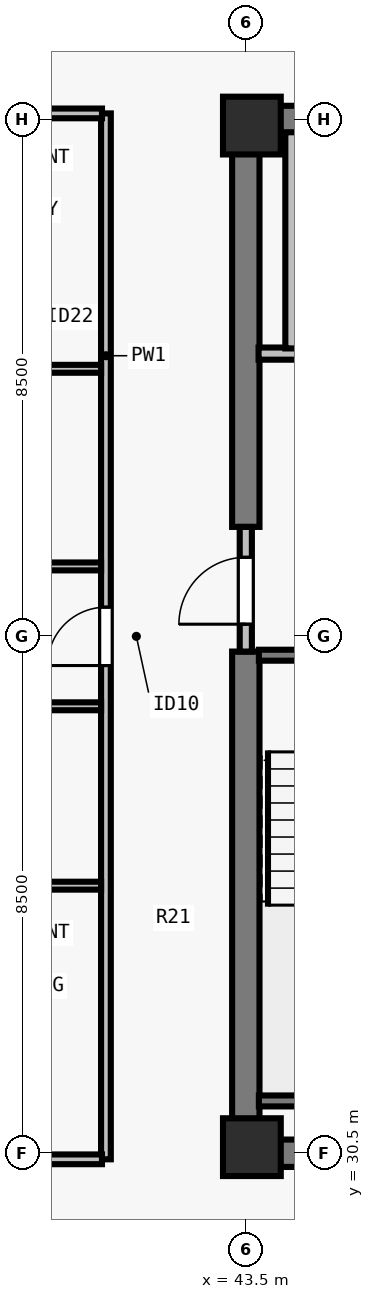
"""IFC4 building model, lengths in metres.
Left out: names, types, materials, properties, quantities, classifications, styles, units other than length and angle.
Written with IfcOpenShell. Run it as: python <this file> out.ifc"""

import sys

from ifc_helpers import new_model, si_unit, direction, frame, frame_2d, origin, origin_2d, place, context, subcontext, project, spatial, rectangle, extrude, element, fill, save


model = new_model("IFC4")
c1 = context("Model", 3, precision=1e-05, world=origin(), true_north=direction((0.0, 1.0)))
c2 = subcontext(c1, "Body", "Model", "MODEL_VIEW")
j1 = project(units=[si_unit("LENGTHUNIT", "METRE"), si_unit("PLANEANGLEUNIT", "RADIAN")], contexts=[c1])
p1 = place(None, origin())
s1 = spatial("IfcSite", under=j1, at=p1, CompositionType="ELEMENT")
p2 = place(p1, origin())
s2 = spatial("IfcBuilding", under=s1, at=p2, CompositionType="ELEMENT")
p3 = place(p2, frame((0.0, 0.0, 262.0)))
s3 = spatial("IfcBuildingStorey", under=s2, at=p3, CompositionType="ELEMENT", Elevation=262.0)
for number, where, z_axis, x_axis in (
    (1, (43.6, 30.6, 0.0), (0.0, 0.0, 1.0), (1.0, 0.0, 0.0)),
    (2, (43.6, 47.4, 0.0), (0.0, 0.0, 1.0), (1.0, 0.0, 0.0)),
):
    element("IfcColumn", number, at=place(p3, frame(where, z_axis=z_axis, x_axis=x_axis)), inside=s3, PredefinedType="COLUMN", context=c2, shape_type="SweptSolid", body=[
        extrude(rectangle(XDim=0.95, YDim=0.95, at=origin_2d()), origin(), (0.0, 0.0, 1.0), 3.5),
    ])
for number, where, z_axis, x_axis in (
    (3, (43.275, 30.5, 0.0), (0.0, 0.0, 1.0), (1.0, 0.0, 0.0)),
    (4, (43.275, 47.5, 0.0), (0.0, 0.0, 1.0), (1.0, 0.0, 0.0)),
):
    element("IfcWall", number, at=place(p3, frame(where, z_axis=z_axis, x_axis=x_axis)), inside=s3, PredefinedType="SHEAR", context=c2, shape_type="SweptSolid", body=[
        extrude(rectangle(XDim=17.45, YDim=0.45, at=frame_2d((8.725, 0.0))), origin(), (0.0, 0.0, 1.0), 3.29),
    ])
p4 = place(p3, frame((43.5, 30.715, 0.0), z_axis=(0.0, 0.0, 1.0), x_axis=(0.0, 1.0, 0.0)))
e5 = element("IfcWall", 5, at=p4, inside=s3, PredefinedType="SHEAR", context=c2, shape_type="SweptSolid", body=[
    extrude(rectangle(XDim=8.035, YDim=0.45, at=frame_2d((4.018, 0.0))), origin(), (0.0, 0.0, 1.0), 3.29),
])
p5 = place(p3, frame((43.5, 40.8, 0.0), z_axis=(0.0, 0.0, 1.0), x_axis=(0.0, 1.0, 0.0)))
e6 = element("IfcWall", 6, at=p5, inside=s3, PredefinedType="SHEAR", context=c2, shape_type="SweptSolid", body=[
    extrude(rectangle(XDim=6.485, YDim=0.45, at=frame_2d((3.242, 0.0))), origin(), (0.0, 0.0, 1.0), 3.29),
])
p6 = place(p3, frame((43.5, 38.75, 0.0), z_axis=(0.0, 0.0, 1.0), x_axis=(0.0, 1.0, 0.0)))
e7 = element("IfcWall", 7, at=p6, inside=s3, PredefinedType="SOLIDWALL", context=c2, shape_type="SweptSolid", body=[
    extrude(rectangle(XDim=2.05, YDim=0.2, at=frame_2d((1.025, 0.0))), origin(), (0.0, 0.0, 1.0), 3.29),
])
p7 = place(p6, frame((0.45, 0.0, 0.0)))
e8 = element("IfcOpeningElement", 8, at=p7, cuts=e7, PredefinedType="OPENING", context=c2, shape_type="SweptSolid", body=[
    extrude(rectangle(XDim=1.1, YDim=2.15, at=frame_2d((0.55, 1.075))), frame((0.0, 0.11, 0.0), z_axis=(0.0, -1.0, 0.0), x_axis=(1.0, 0.0, 0.0)), (0.0, 0.0, 1.0), 0.22),
])
p8 = place(p3, frame((43.71, 43.65, 0.0), z_axis=(0.0, 0.0, 1.0), x_axis=(1.0, 0.0, 0.0)))
e9 = element("IfcWall", 9, at=p8, inside=s3, PredefinedType="SOLIDWALL", context=c2, shape_type="SweptSolid", body=[
    extrude(rectangle(XDim=3.555, YDim=0.2, at=frame_2d((1.777, 0.0))), origin(), (0.0, 0.0, 1.0), 3.29),
])
p9 = place(p8, frame((1.16, 0.0, 0.0)))
e10 = element("IfcOpeningElement", 10, at=p9, cuts=e9, PredefinedType="OPENING", context=c2, shape_type="SweptSolid", body=[
    extrude(rectangle(XDim=1.1, YDim=2.2, at=frame_2d((0.55, 1.1))), frame((0.0, 0.11, 0.0), z_axis=(0.0, -1.0, 0.0), x_axis=(1.0, 0.0, 0.0)), (0.0, 0.0, 1.0), 0.22),
])
p10 = place(p3, frame((44.25, 43.735, 0.0), z_axis=(0.0, 0.0, 1.0), x_axis=(0.0, 1.0, 0.0)))
e11 = element("IfcWall", 11, at=p10, inside=s3, PredefinedType="SOLIDWALL", context=c2, shape_type="SweptSolid", body=[
    extrude(rectangle(XDim=3.555, YDim=0.2, at=frame_2d((1.777, 0.0))), origin(), (0.0, 0.0, 1.0), 3.29),
])
p11 = place(p3, frame((41.2, 30.4, 0.0), z_axis=(0.0, 0.0, 1.0), x_axis=(0.0, 1.0, 0.0)))
e12 = element("IfcWall", 12, at=p11, inside=s3, PredefinedType="PARTITIONING", context=c2, shape_type="SweptSolid", body=[
    extrude(rectangle(XDim=17.2, YDim=0.16, at=frame_2d((8.6, 0.0))), origin(), (0.0, 0.0, 1.0), 3.29),
])
p12 = place(p11, frame((8.12, 0.0, 0.0)))
e13 = element("IfcOpeningElement", 13, at=p12, cuts=e12, PredefinedType="OPENING", context=c2, shape_type="SweptSolid", body=[
    extrude(rectangle(XDim=0.96, YDim=2.18, at=frame_2d((0.48, 1.09))), frame((0.0, 0.09, 0.0), z_axis=(0.0, -1.0, 0.0), x_axis=(1.0, 0.0, 0.0)), (0.0, 0.0, 1.0), 0.18),
])
for number, where, z_axis, x_axis in (
    (14, (29.805, 30.4, 0.0), (0.0, 0.0, 1.0), (1.0, 0.0, 0.0)),
    (15, (29.805, 47.6, 0.0), (0.0, 0.0, 1.0), (1.0, 0.0, 0.0)),
):
    element("IfcWall", number, at=place(p3, frame(where, z_axis=z_axis, x_axis=x_axis)), inside=s3, PredefinedType="PARTITIONING", context=c2, shape_type="SweptSolid", body=[
        extrude(rectangle(XDim=11.33, YDim=0.16, at=frame_2d((5.665, 0.0))), origin(), (0.0, 0.0, 1.0), 3.29),
    ])
p13 = place(p3, frame((38.37, 34.9, 0.0), z_axis=(0.0, 0.0, 1.0), x_axis=(1.0, 0.0, 0.0)))
e16 = element("IfcWall", 16, at=p13, inside=s3, PredefinedType="PLUMBINGWALL", context=c2, shape_type="SweptSolid", body=[
    extrude(rectangle(XDim=2.75, YDim=0.13, at=frame_2d((1.375, 0.0))), origin(), (0.0, 0.0, 1.0), 3.29),
])
p14 = place(p3, frame((38.37, 37.85, 0.0), z_axis=(0.0, 0.0, 1.0), x_axis=(1.0, 0.0, 0.0)))
e17 = element("IfcWall", 17, at=p14, inside=s3, PredefinedType="PLUMBINGWALL", context=c2, shape_type="SweptSolid", body=[
    extrude(rectangle(XDim=2.75, YDim=0.13, at=frame_2d((1.375, 0.0))), origin(), (0.0, 0.0, 1.0), 3.29),
])
p15 = place(p14, frame((0.55, 0.0, 0.0)))
e18 = element("IfcOpeningElement", 18, at=p15, cuts=e17, PredefinedType="OPENING", context=c2, shape_type="SweptSolid", body=[
    extrude(rectangle(XDim=0.85, YDim=2.08, at=frame_2d((0.425, 1.04))), frame((0.0, 0.075, 0.0), z_axis=(0.0, -1.0, 0.0), x_axis=(1.0, 0.0, 0.0)), (0.0, 0.0, 1.0), 0.15),
])
p16 = place(p3, frame((38.37, 43.4, 0.0), z_axis=(0.0, 0.0, 1.0), x_axis=(1.0, 0.0, 0.0)))
e19 = element("IfcWall", 19, at=p16, inside=s3, PredefinedType="PLUMBINGWALL", context=c2, shape_type="SweptSolid", body=[
    extrude(rectangle(XDim=2.75, YDim=0.13, at=frame_2d((1.375, 0.0))), origin(), (0.0, 0.0, 1.0), 2.958),
])
p17 = place(p3, frame((38.37, 40.15, 0.0), z_axis=(0.0, 0.0, 1.0), x_axis=(1.0, 0.0, 0.0)))
e20 = element("IfcWall", 20, at=p17, inside=s3, PredefinedType="PLUMBINGWALL", context=c2, shape_type="SweptSolid", body=[
    extrude(rectangle(XDim=2.75, YDim=0.13, at=frame_2d((1.375, 0.0))), origin(), (0.0, 0.0, 1.0), 3.29),
])
p18 = place(p17, frame((0.55, 0.0, 0.0)))
e21 = element("IfcOpeningElement", 21, at=p18, cuts=e20, PredefinedType="OPENING", context=c2, shape_type="SweptSolid", body=[
    extrude(rectangle(XDim=0.88, YDim=2.1, at=frame_2d((0.44, 1.05))), frame((0.0, 0.075, 0.0), z_axis=(0.0, -1.0, 0.0), x_axis=(1.0, 0.0, 0.0)), (0.0, 0.0, 1.0), 0.15),
])
p19 = place(p3, frame((43.715, 38.69, 0.0), z_axis=(0.0, 0.0, 1.0), x_axis=(1.0, 0.0, 0.0)))
e22 = element("IfcWall", 22, at=p19, inside=s3, PredefinedType="SOLIDWALL", context=c2, shape_type="SweptSolid", body=[
    extrude(rectangle(XDim=3.28, YDim=0.18, at=frame_2d((1.64, 0.0))), origin(), (0.0, 0.0, 1.0), 3.29),
])
p20 = place(p19, frame((1.165, 0.0, 0.0)))
e23 = element("IfcOpeningElement", 23, at=p20, cuts=e22, PredefinedType="OPENING", context=c2, shape_type="SweptSolid", body=[
    extrude(rectangle(XDim=0.95, YDim=2.15, at=frame_2d((0.475, 1.075))), frame((0.0, 0.1, 0.0), z_axis=(0.0, -1.0, 0.0), x_axis=(1.0, 0.0, 0.0)), (0.0, 0.0, 1.0), 0.2),
])
p21 = place(p3, frame((43.715, 31.36, 0.0), z_axis=(0.0, 0.0, 1.0), x_axis=(1.0, 0.0, 0.0)))
e24 = element("IfcWall", 24, at=p21, inside=s3, PredefinedType="SOLIDWALL", context=c2, shape_type="SweptSolid", body=[
    extrude(rectangle(XDim=3.28, YDim=0.18, at=frame_2d((1.64, 0.0))), origin(), (0.0, 0.0, 1.0), 3.29),
])
p22 = place(p7, origin())
e25 = element("IfcDoor", 25, at=p22, inside=s3, OperationType="SINGLE_SWING_LEFT", PredefinedType="DOOR", context=c2, shape_type="SweptSolid", body=[
    extrude(rectangle(XDim=1.1, YDim=2.15, at=frame_2d((0.55, 1.075))), frame((0.0, 0.025, 0.0), z_axis=(0.0, -1.0, 0.0), x_axis=(1.0, 0.0, 0.0)), (0.0, 0.0, 1.0), 0.05),
])
fill(e8, e25)
p23 = place(p12, origin())
e26 = element("IfcDoor", 26, at=p23, inside=s3, OperationType="SINGLE_SWING_LEFT", PredefinedType="DOOR", context=c2, shape_type="SweptSolid", body=[
    extrude(rectangle(XDim=0.96, YDim=2.18, at=frame_2d((0.48, 1.09))), frame((0.0, 0.025, 0.0), z_axis=(0.0, -1.0, 0.0), x_axis=(1.0, 0.0, 0.0)), (0.0, 0.0, 1.0), 0.05),
])
fill(e13, e26)
save(model, sys.argv[1])
